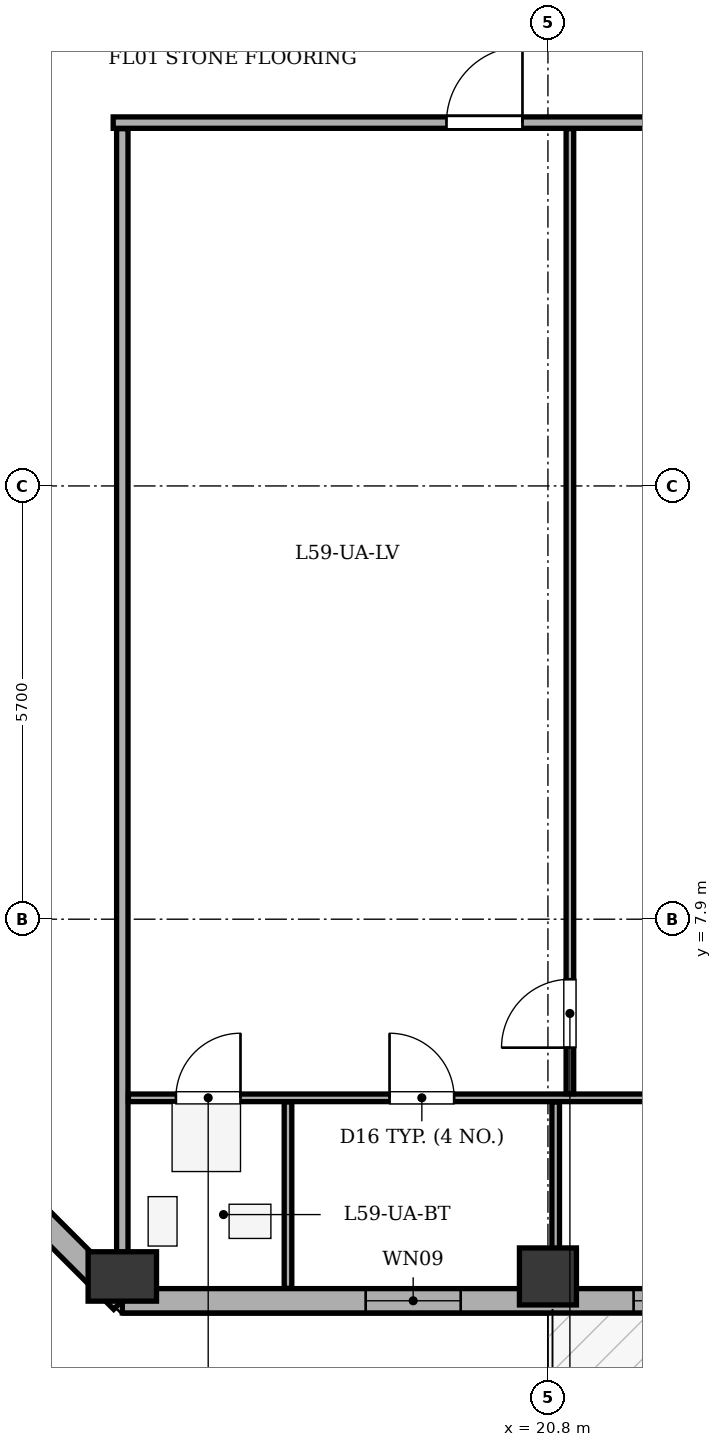
"""IFC4 building model, lengths in metres.
Left out: names, types, materials, properties, quantities, classifications, styles, units other than length and angle.
Written with IfcOpenShell. Run it as: python <this file> out.ifc"""

import sys

from ifc_helpers import new_model, si_unit, direction, frame, frame_2d, origin, origin_2d, place, context, subcontext, project, spatial, rectangle, extrude, element, fill, save


model = new_model("IFC4")
c1 = context("Model", 3, precision=1e-05, world=origin(), true_north=direction((0.0, 1.0)))
c2 = subcontext(c1, "Body", "Model", "MODEL_VIEW")
j1 = project(units=[si_unit("LENGTHUNIT", "METRE"), si_unit("PLANEANGLEUNIT", "RADIAN")], contexts=[c1])
p1 = place(None, origin())
s1 = spatial("IfcSite", under=j1, at=p1, CompositionType="ELEMENT")
p2 = place(p1, origin())
s2 = spatial("IfcBuilding", under=s1, at=p2, CompositionType="ELEMENT")
p3 = place(p2, frame((0.0, 0.0, 227.9)))
s3 = spatial("IfcBuildingStorey", under=s2, at=p3, CompositionType="ELEMENT", Elevation=227.9)
p4 = place(p3, frame((15.2, 3.2, 0.0), z_axis=(0.0, 0.0, 1.0), x_axis=(1.0, 0.0, 0.0)))
e1 = element("IfcColumn", 1, at=p4, inside=s3, PredefinedType="COLUMN", context=c2, shape_type="SweptSolid", body=[
    extrude(rectangle(XDim=0.65, YDim=0.9, at=origin_2d()), origin(), (0.0, 0.0, 1.0), 3.4),
])
p5 = place(p3, frame((20.8, 3.2, 0.0), z_axis=(0.0, 0.0, 1.0), x_axis=(1.0, 0.0, 0.0)))
e2 = element("IfcColumn", 2, at=p5, inside=s3, PredefinedType="COLUMN", context=c2, shape_type="SweptSolid", body=[
    extrude(rectangle(XDim=0.75, YDim=0.75, at=origin_2d()), origin(), (0.0, 0.0, 1.0), 3.4),
])
p6 = place(p3, frame((51.2, 2.88, 0.0), z_axis=(0.0, 0.0, 1.0), x_axis=(-1.0, 0.0, 0.0)))
e3 = element("IfcWall", 3, at=p6, inside=s3, PredefinedType="STANDARD", context=c2, shape_type="SweptSolid", body=[
    extrude(rectangle(XDim=36.0, YDim=0.32, at=frame_2d((18.0, 0.0))), origin(), (0.0, 0.0, 1.0), 2.725),
])
p7 = place(p6, frame((18.9, 0.0, 0.0)))
e4 = element("IfcOpeningElement", 4, at=p7, cuts=e3, PredefinedType="OPENING", context=c2, shape_type="SweptSolid", body=[
    extrude(rectangle(XDim=1.0, YDim=2.02, at=frame_2d((0.5, 1.01))), frame((0.0, 0.17, 0.0), z_axis=(0.0, -1.0, 0.0), x_axis=(1.0, 0.0, 0.0)), (0.0, 0.0, 1.0), 0.34),
])
p8 = place(p6, frame((2.31, 0.0, 0.75)))
e5 = element("IfcOpeningElement", 5, at=p8, cuts=e3, PredefinedType="OPENING", context=c2, shape_type="SweptSolid", body=[
    extrude(rectangle(XDim=1.8, YDim=1.7, at=frame_2d((0.9, 0.85))), frame((0.0, 0.17, 0.0), z_axis=(0.0, -1.0, 0.0), x_axis=(1.0, 0.0, 0.0)), (0.0, 0.0, 1.0), 0.34),
])
p9 = place(p6, frame((7.294, 0.0, 0.75)))
e6 = element("IfcOpeningElement", 6, at=p9, cuts=e3, PredefinedType="OPENING", context=c2, shape_type="SweptSolid", body=[
    extrude(rectangle(XDim=1.8, YDim=1.7, at=frame_2d((0.9, 0.85))), frame((0.0, 0.17, 0.0), z_axis=(0.0, -1.0, 0.0), x_axis=(1.0, 0.0, 0.0)), (0.0, 0.0, 1.0), 0.34),
])
p10 = place(p6, frame((11.117, 0.0, 0.75)))
e7 = element("IfcOpeningElement", 7, at=p10, cuts=e3, PredefinedType="OPENING", context=c2, shape_type="SweptSolid", body=[
    extrude(rectangle(XDim=1.8, YDim=1.7, at=frame_2d((0.9, 0.85))), frame((0.0, 0.17, 0.0), z_axis=(0.0, -1.0, 0.0), x_axis=(1.0, 0.0, 0.0)), (0.0, 0.0, 1.0), 0.34),
])
p11 = place(p6, frame((27.473, 0.0, 0.75)))
e8 = element("IfcOpeningElement", 8, at=p11, cuts=e3, PredefinedType="OPENING", context=c2, shape_type="SweptSolid", body=[
    extrude(rectangle(XDim=1.8, YDim=1.7, at=frame_2d((0.9, 0.85))), frame((0.0, 0.17, 0.0), z_axis=(0.0, -1.0, 0.0), x_axis=(1.0, 0.0, 0.0)), (0.0, 0.0, 1.0), 0.34),
])
p12 = place(p6, frame((31.548, 0.0, 0.75)))
e9 = element("IfcOpeningElement", 9, at=p12, cuts=e3, PredefinedType="OPENING", context=c2, shape_type="SweptSolid", body=[
    extrude(rectangle(XDim=1.25, YDim=1.7, at=frame_2d((0.625, 0.85))), frame((0.0, 0.17, 0.0), z_axis=(0.0, -1.0, 0.0), x_axis=(1.0, 0.0, 0.0)), (0.0, 0.0, 1.0), 0.34),
])
p13 = place(p3, frame((15.2, 2.88, 0.0), z_axis=(0.0, 0.0, 1.0), x_axis=(-0.707106781187, 0.707106781187, 0.0)))
e10 = element("IfcWall", 10, at=p13, inside=s3, PredefinedType="STANDARD", context=c2, shape_type="SweptSolid", body=[
    extrude(rectangle(XDim=6.11, YDim=0.32, at=frame_2d((3.055, 0.0))), origin(), (0.0, 0.0, 1.0), 2.725),
])
p14 = place(p13, frame((2.355, 0.0, 0.75)))
e11 = element("IfcOpeningElement", 11, at=p14, cuts=e10, PredefinedType="OPENING", context=c2, shape_type="SweptSolid", body=[
    extrude(rectangle(XDim=1.4, YDim=1.65, at=frame_2d((0.7, 0.825))), frame((0.0, 0.17, 0.0), z_axis=(0.0, -1.0, 0.0), x_axis=(1.0, 0.0, 0.0)), (0.0, 0.0, 1.0), 0.34),
])
p15 = place(p3, frame((15.08, 18.38, 0.0), z_axis=(0.0, 0.0, 1.0), x_axis=(1.0, 0.0, 0.0)))
e12 = element("IfcWall", 12, at=p15, inside=s3, PredefinedType="PARTITIONING", context=c2, shape_type="SweptSolid", body=[
    extrude(rectangle(XDim=30.02, YDim=0.15, at=frame_2d((15.01, 0.0))), origin(), (0.0, 0.0, 1.0), 3.1),
])
p16 = place(p15, frame((4.385, 0.0, 0.0)))
e13 = element("IfcOpeningElement", 13, at=p16, cuts=e12, PredefinedType="OPENING", context=c2, shape_type="SweptSolid", body=[
    extrude(rectangle(XDim=1.0, YDim=2.1, at=frame_2d((0.5, 1.05))), frame((0.0, 0.085, 0.0), z_axis=(0.0, -1.0, 0.0), x_axis=(1.0, 0.0, 0.0)), (0.0, 0.0, 1.0), 0.17),
])
p17 = place(p15, frame((14.361, 0.0, 0.0)))
e14 = element("IfcOpeningElement", 14, at=p17, cuts=e12, PredefinedType="OPENING", context=c2, shape_type="SweptSolid", body=[
    extrude(rectangle(XDim=1.0, YDim=2.1, at=frame_2d((0.5, 1.05))), frame((0.0, 0.085, 0.0), z_axis=(0.0, -1.0, 0.0), x_axis=(1.0, 0.0, 0.0)), (0.0, 0.0, 1.0), 0.17),
])
p18 = place(p15, frame((24.486, 0.0, 0.0)))
e15 = element("IfcOpeningElement", 15, at=p18, cuts=e12, PredefinedType="OPENING", context=c2, shape_type="SweptSolid", body=[
    extrude(rectangle(XDim=1.0, YDim=2.1, at=frame_2d((0.5, 1.05))), frame((0.0, 0.085, 0.0), z_axis=(0.0, -1.0, 0.0), x_axis=(1.0, 0.0, 0.0)), (0.0, 0.0, 1.0), 0.17),
])
p19 = place(p3, frame((15.2, 3.045, 0.0), z_axis=(0.0, 0.0, 1.0), x_axis=(0.0, 1.0, 0.0)))
e16 = element("IfcWall", 16, at=p19, inside=s3, PredefinedType="PARTITIONING", context=c2, shape_type="SweptSolid", body=[
    extrude(rectangle(XDim=15.255, YDim=0.15, at=frame_2d((7.627, 0.0))), origin(), (0.0, 0.0, 1.0), 3.1),
])
p20 = place(p3, frame((15.28, 5.55, 0.0), z_axis=(0.0, 0.0, 1.0), x_axis=(1.0, 0.0, 0.0)))
e17 = element("IfcWall", 17, at=p20, inside=s3, PredefinedType="PARTITIONING", context=c2, shape_type="SweptSolid", body=[
    extrude(rectangle(XDim=9.49, YDim=0.1, at=frame_2d((4.745, 0.0))), origin(), (0.0, 0.0, 1.0), 3.1),
])
p21 = place(p20, frame((0.625, 0.0, 0.0)))
e18 = element("IfcOpeningElement", 18, at=p21, cuts=e17, PredefinedType="OPENING", context=c2, shape_type="SweptSolid", body=[
    extrude(rectangle(XDim=0.85, YDim=2.05, at=frame_2d((0.425, 1.025))), frame((0.0, 0.06, 0.0), z_axis=(0.0, -1.0, 0.0), x_axis=(1.0, 0.0, 0.0)), (0.0, 0.0, 1.0), 0.12),
])
p22 = place(p20, frame((3.436, 0.0, 0.0)))
e19 = element("IfcOpeningElement", 19, at=p22, cuts=e17, PredefinedType="OPENING", context=c2, shape_type="SweptSolid", body=[
    extrude(rectangle(XDim=0.85, YDim=2.05, at=frame_2d((0.425, 1.025))), frame((0.0, 0.06, 0.0), z_axis=(0.0, -1.0, 0.0), x_axis=(1.0, 0.0, 0.0)), (0.0, 0.0, 1.0), 0.12),
])
p23 = place(p20, frame((7.046, 0.0, 0.0)))
e20 = element("IfcOpeningElement", 20, at=p23, cuts=e17, PredefinedType="OPENING", context=c2, shape_type="SweptSolid", body=[
    extrude(rectangle(XDim=0.9, YDim=2.05, at=frame_2d((0.45, 1.025))), frame((0.0, 0.06, 0.0), z_axis=(0.0, -1.0, 0.0), x_axis=(1.0, 0.0, 0.0)), (0.0, 0.0, 1.0), 0.12),
])
p24 = place(p3, frame((21.089, 5.605, 0.0), z_axis=(0.0, 0.0, 1.0), x_axis=(0.0, 1.0, 0.0)))
e21 = element("IfcWall", 21, at=p24, inside=s3, PredefinedType="PARTITIONING", context=c2, shape_type="SweptSolid", body=[
    extrude(rectangle(XDim=12.695, YDim=0.1, at=frame_2d((6.348, 0.0))), origin(), (0.0, 0.0, 1.0), 2.535),
])
p25 = place(p24, frame((0.605, 0.0, 0.0)))
e22 = element("IfcOpeningElement", 22, at=p25, cuts=e21, PredefinedType="OPENING", context=c2, shape_type="SweptSolid", body=[
    extrude(rectangle(XDim=0.9, YDim=2.05, at=frame_2d((0.45, 1.025))), frame((0.0, 0.06, 0.0), z_axis=(0.0, -1.0, 0.0), x_axis=(1.0, 0.0, 0.0)), (0.0, 0.0, 1.0), 0.12),
])
p26 = place(p3, frame((17.38, 3.045, 0.0), z_axis=(0.0, 0.0, 1.0), x_axis=(0.0, 1.0, 0.0)))
e23 = element("IfcWall", 23, at=p26, inside=s3, PredefinedType="PARTITIONING", context=c2, shape_type="SweptSolid", body=[
    extrude(rectangle(XDim=2.45, YDim=0.1, at=frame_2d((1.225, 0.0))), origin(), (0.0, 0.0, 1.0), 3.1),
])
p27 = place(p3, frame((20.902, 3.045, 0.0), z_axis=(0.0, 0.0, 1.0), x_axis=(0.0, 1.0, 0.0)))
e24 = element("IfcWall", 24, at=p27, inside=s3, PredefinedType="PARTITIONING", context=c2, shape_type="SweptSolid", body=[
    extrude(rectangle(XDim=2.45, YDim=0.1, at=frame_2d((1.225, 0.0))), origin(), (0.0, 0.0, 1.0), 2.535),
])
p28 = place(p11, origin())
e25 = element("IfcWindow", 25, at=p28, inside=s3, PartitioningType="SINGLE_PANEL", PredefinedType="WINDOW", context=c2, shape_type="SweptSolid", body=[
    extrude(rectangle(XDim=1.8, YDim=1.7, at=frame_2d((0.9, 0.85))), frame((0.0, -0.01, 0.0), z_axis=(0.0, -1.0, 0.0), x_axis=(1.0, 0.0, 0.0)), (0.0, 0.0, 1.0), 0.06),
])
fill(e8, e25)
p29 = place(p12, origin())
e26 = element("IfcWindow", 26, at=p29, inside=s3, PartitioningType="SINGLE_PANEL", PredefinedType="WINDOW", context=c2, shape_type="SweptSolid", body=[
    extrude(rectangle(XDim=1.25, YDim=1.7, at=frame_2d((0.625, 0.85))), frame((0.0, -0.01, 0.0), z_axis=(0.0, -1.0, 0.0), x_axis=(1.0, 0.0, 0.0)), (0.0, 0.0, 1.0), 0.06),
])
fill(e9, e26)
p30 = place(p16, origin())
e27 = element("IfcDoor", 27, at=p30, inside=s3, OperationType="SINGLE_SWING_RIGHT", PredefinedType="DOOR", context=c2, shape_type="SweptSolid", body=[
    extrude(rectangle(XDim=1.0, YDim=2.1, at=frame_2d((0.5, 1.05))), frame((0.0, 0.025, 0.0), z_axis=(0.0, -1.0, 0.0), x_axis=(1.0, 0.0, 0.0)), (0.0, 0.0, 1.0), 0.05),
])
fill(e13, e27)
p31 = place(p25, origin())
e28 = element("IfcDoor", 28, at=p31, inside=s3, OperationType="SINGLE_SWING_LEFT", PredefinedType="DOOR", context=c2, shape_type="SweptSolid", body=[
    extrude(rectangle(XDim=0.9, YDim=2.05, at=frame_2d((0.45, 1.025))), frame((0.0, 0.025, 0.0), z_axis=(0.0, -1.0, 0.0), x_axis=(1.0, 0.0, 0.0)), (0.0, 0.0, 1.0), 0.05),
])
fill(e22, e28)
p32 = place(p21, origin())
e29 = element("IfcDoor", 29, at=p32, inside=s3, OperationType="SINGLE_SWING_RIGHT", PredefinedType="DOOR", context=c2, shape_type="SweptSolid", body=[
    extrude(rectangle(XDim=0.85, YDim=2.05, at=frame_2d((0.425, 1.025))), frame((0.0, 0.025, 0.0), z_axis=(0.0, -1.0, 0.0), x_axis=(1.0, 0.0, 0.0)), (0.0, 0.0, 1.0), 0.05),
])
fill(e18, e29)
p33 = place(p22, origin())
e30 = element("IfcDoor", 30, at=p33, inside=s3, OperationType="SINGLE_SWING_LEFT", PredefinedType="DOOR", context=c2, shape_type="SweptSolid", body=[
    extrude(rectangle(XDim=0.85, YDim=2.05, at=frame_2d((0.425, 1.025))), frame((0.0, 0.025, 0.0), z_axis=(0.0, -1.0, 0.0), x_axis=(1.0, 0.0, 0.0)), (0.0, 0.0, 1.0), 0.05),
])
fill(e19, e30)
save(model, sys.argv[1])
